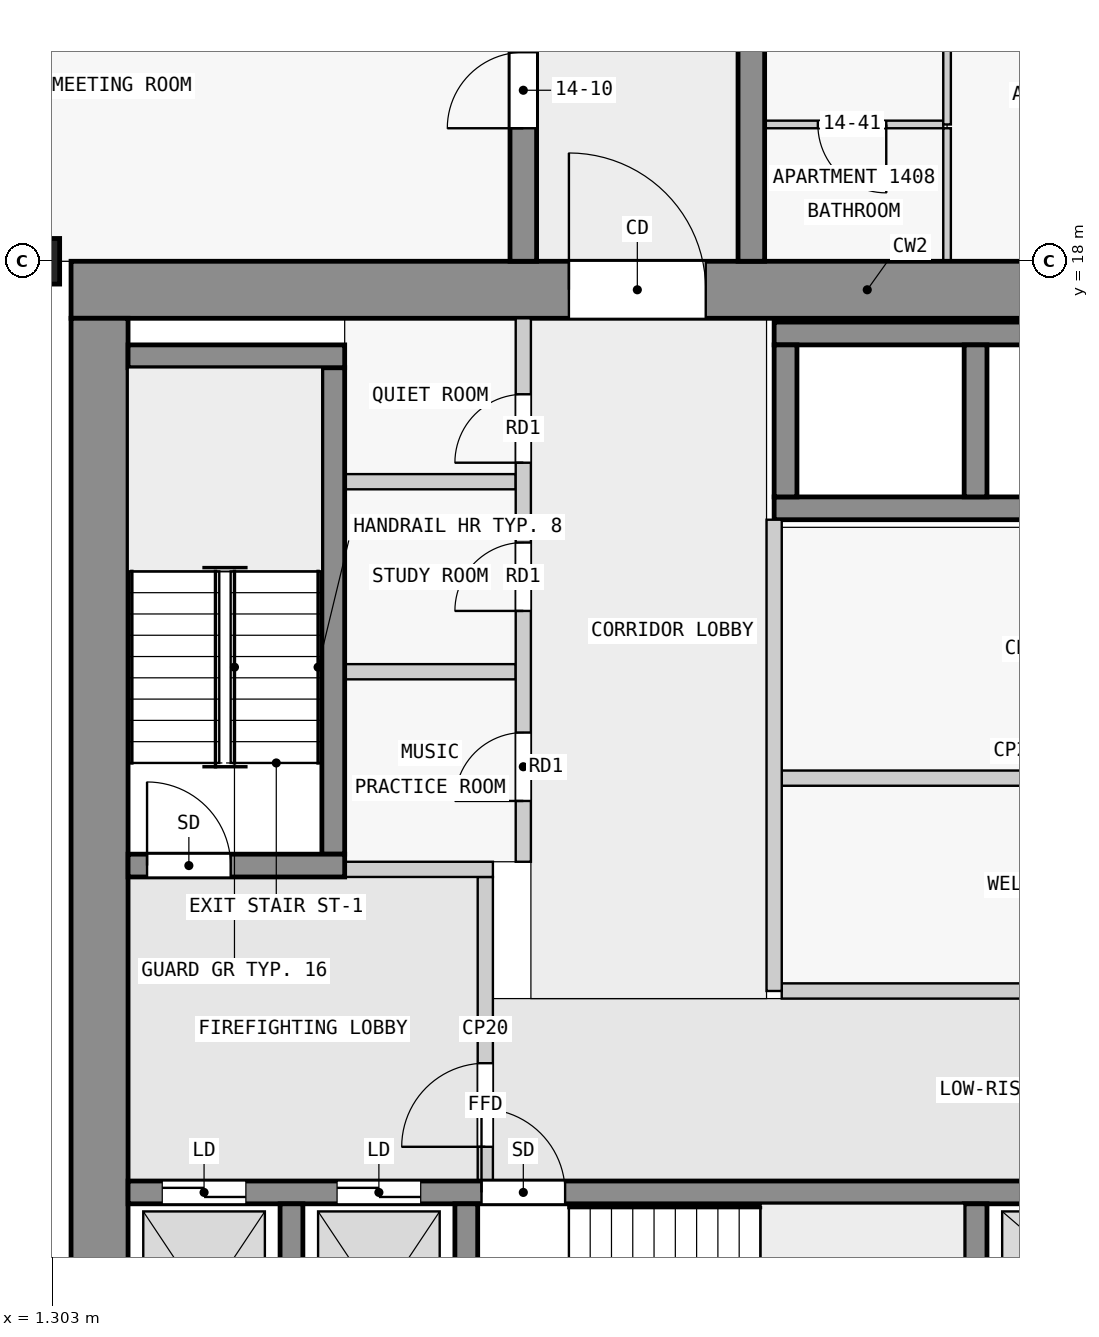
"""IFC4 building model, lengths in metres.
Left out: names, types, materials, properties, quantities, classifications, styles, units other than length and angle.
Written with IfcOpenShell. Run it as: python <this file> out.ifc"""

import sys

from ifc_helpers import new_model, si_unit, direction, frame, frame_2d, origin, origin_2d, place, context, subcontext, project, spatial, rectangle, extrude, element, fill, save


model = new_model("IFC4")
c1 = context("Model", 3, precision=1e-05, world=origin(), true_north=direction((0.0, 1.0)))
c2 = subcontext(c1, "Body", "Model", "MODEL_VIEW")
j1 = project(units=[si_unit("LENGTHUNIT", "METRE"), si_unit("PLANEANGLEUNIT", "RADIAN")], contexts=[c1])
p1 = place(None, origin())
s1 = spatial("IfcSite", under=j1, at=p1, CompositionType="ELEMENT")
p2 = place(p1, origin())
s2 = spatial("IfcBuilding", under=s1, at=p2, CompositionType="ELEMENT")
p3 = place(p2, frame((0.0, 0.0, 58.3)))
s3 = spatial("IfcBuildingStorey", under=s2, at=p3, CompositionType="ELEMENT", Elevation=58.3)
p4 = place(p3, frame((0.7, 18.0, 0.0), z_axis=(0.0, 0.0, 1.0), x_axis=(0.0, 1.0, 0.0)))
e1 = element("IfcColumn", 1, at=p4, inside=s3, PredefinedType="COLUMN", context=c2, shape_type="SweptSolid", body=[
    extrude(rectangle(XDim=0.6, YDim=1.4, at=origin_2d()), origin(), (0.0, 0.0, 1.0), 3.5),
])
p5 = place(p3, frame((1.55, 17.625, 0.0), z_axis=(0.0, 0.0, 1.0), x_axis=(1.0, 0.0, 0.0)))
e2 = element("IfcWall", 2, at=p5, inside=s3, PredefinedType="SHEAR", context=c2, shape_type="SweptSolid", body=[
    extrude(rectangle(XDim=20.95, YDim=0.75, at=frame_2d((10.475, 0.0))), origin(), (0.0, 0.0, 1.0), 3.25),
])
p6 = place(p5, frame((6.55, 0.0, 0.0)))
e3 = element("IfcOpeningElement", 3, at=p6, cuts=e2, PredefinedType="OPENING", context=c2, shape_type="SweptSolid", body=[
    extrude(rectangle(XDim=1.8, YDim=2.1, at=frame_2d((0.9, 1.05))), frame((0.0, 0.385, 0.0), z_axis=(0.0, -1.0, 0.0), x_axis=(1.0, 0.0, 0.0)), (0.0, 0.0, 1.0), 0.77),
])
p7 = place(p3, frame((1.925, 2.5, 0.0), z_axis=(0.0, 0.0, 1.0), x_axis=(0.0, 1.0, 0.0)))
e4 = element("IfcWall", 4, at=p7, inside=s3, PredefinedType="SHEAR", context=c2, shape_type="SweptSolid", body=[
    extrude(rectangle(XDim=14.75, YDim=0.75, at=frame_2d((7.375, 0.0))), origin(), (0.0, 0.0, 1.0), 3.25),
])
for number, where, z_axis, x_axis in (
    (5, (4.45, 2.8, 0.0), (0.0, 0.0, 1.0), (0.0, 1.0, 0.0)),
    (6, (6.75, 2.8, 0.0), (0.0, 0.0, 1.0), (0.0, 1.0, 0.0)),
    (7, (13.45, 2.8, 0.0), (0.0, 0.0, 1.0), (0.0, 1.0, 0.0)),
):
    element("IfcWall", number, at=place(p3, frame(where, z_axis=z_axis, x_axis=x_axis)), inside=s3, PredefinedType="SHEAR", context=c2, shape_type="SweptSolid", body=[
        extrude(rectangle(XDim=2.8, YDim=0.3, at=frame_2d((1.4, 0.0))), origin(), (0.0, 0.0, 1.0), 3.25),
    ])
p8 = place(p3, frame((2.3, 5.75, 0.0), z_axis=(0.0, 0.0, 1.0), x_axis=(1.0, 0.0, 0.0)))
e8 = element("IfcWall", 8, at=p8, inside=s3, PredefinedType="SHEAR", context=c2, shape_type="SweptSolid", body=[
    extrude(rectangle(XDim=18.8, YDim=0.3, at=frame_2d((9.4, 0.0))), origin(), (0.0, 0.0, 1.0), 3.25),
])
p9 = place(p8, frame((4.65, 0.0, 0.0)))
e9 = element("IfcOpeningElement", 9, at=p9, cuts=e8, PredefinedType="OPENING", context=c2, shape_type="SweptSolid", body=[
    extrude(rectangle(XDim=1.1, YDim=2.1, at=frame_2d((0.55, 1.05))), frame((0.0, 0.16, 0.0), z_axis=(0.0, -1.0, 0.0), x_axis=(1.0, 0.0, 0.0)), (0.0, 0.0, 1.0), 0.32),
])
p10 = place(p8, frame((0.45, 0.0, 0.0)))
e10 = element("IfcOpeningElement", 10, at=p10, cuts=e8, PredefinedType="OPENING", context=c2, shape_type="SweptSolid", body=[
    extrude(rectangle(XDim=1.1, YDim=2.1, at=frame_2d((0.55, 1.05))), frame((0.0, 0.16, 0.0), z_axis=(0.0, -1.0, 0.0), x_axis=(1.0, 0.0, 0.0)), (0.0, 0.0, 1.0), 0.32),
])
p11 = place(p8, frame((2.75, 0.0, 0.0)))
e11 = element("IfcOpeningElement", 11, at=p11, cuts=e8, PredefinedType="OPENING", context=c2, shape_type="SweptSolid", body=[
    extrude(rectangle(XDim=1.1, YDim=2.1, at=frame_2d((0.55, 1.05))), frame((0.0, 0.16, 0.0), z_axis=(0.0, -1.0, 0.0), x_axis=(1.0, 0.0, 0.0)), (0.0, 0.0, 1.0), 0.32),
])
p12 = place(p8, frame((11.85, 0.0, 0.0)))
e12 = element("IfcOpeningElement", 12, at=p12, cuts=e8, PredefinedType="OPENING", context=c2, shape_type="SweptSolid", body=[
    extrude(rectangle(XDim=1.1, YDim=2.1, at=frame_2d((0.55, 1.05))), frame((0.0, 0.16, 0.0), z_axis=(0.0, -1.0, 0.0), x_axis=(1.0, 0.0, 0.0)), (0.0, 0.0, 1.0), 0.32),
])
p13 = place(p8, frame((14.35, 0.0, 0.0)))
e13 = element("IfcOpeningElement", 13, at=p13, cuts=e8, PredefinedType="OPENING", context=c2, shape_type="SweptSolid", body=[
    extrude(rectangle(XDim=1.1, YDim=2.1, at=frame_2d((0.55, 1.05))), frame((0.0, 0.16, 0.0), z_axis=(0.0, -1.0, 0.0), x_axis=(1.0, 0.0, 0.0)), (0.0, 0.0, 1.0), 0.32),
])
p14 = place(p8, frame((16.85, 0.0, 0.0)))
e14 = element("IfcOpeningElement", 14, at=p14, cuts=e8, PredefinedType="OPENING", context=c2, shape_type="SweptSolid", body=[
    extrude(rectangle(XDim=1.1, YDim=2.1, at=frame_2d((0.55, 1.05))), frame((0.0, 0.16, 0.0), z_axis=(0.0, -1.0, 0.0), x_axis=(1.0, 0.0, 0.0)), (0.0, 0.0, 1.0), 0.32),
])
p15 = place(p3, frame((2.3, 10.05, 0.0), z_axis=(0.0, 0.0, 1.0), x_axis=(1.0, 0.0, 0.0)))
e15 = element("IfcWall", 15, at=p15, inside=s3, PredefinedType="SHEAR", context=c2, shape_type="SweptSolid", body=[
    extrude(rectangle(XDim=2.85, YDim=0.3, at=frame_2d((1.425, 0.0))), origin(), (0.0, 0.0, 1.0), 3.25),
])
p16 = place(p15, frame((0.25, 0.0, 0.0)))
e16 = element("IfcOpeningElement", 16, at=p16, cuts=e15, PredefinedType="OPENING", context=c2, shape_type="SweptSolid", body=[
    extrude(rectangle(XDim=1.1, YDim=2.1, at=frame_2d((0.55, 1.05))), frame((0.0, 0.16, 0.0), z_axis=(0.0, -1.0, 0.0), x_axis=(1.0, 0.0, 0.0)), (0.0, 0.0, 1.0), 0.32),
])
p17 = place(p3, frame((5.0, 10.2, 0.0), z_axis=(0.0, 0.0, 1.0), x_axis=(0.0, 1.0, 0.0)))
e17 = element("IfcWall", 17, at=p17, inside=s3, PredefinedType="SHEAR", context=c2, shape_type="SweptSolid", body=[
    extrude(rectangle(XDim=6.4, YDim=0.3, at=frame_2d((3.2, 0.0))), origin(), (0.0, 0.0, 1.0), 3.25),
])
p18 = place(p3, frame((2.3, 16.75, 0.0), z_axis=(0.0, 0.0, 1.0), x_axis=(1.0, 0.0, 0.0)))
e18 = element("IfcWall", 18, at=p18, inside=s3, PredefinedType="SHEAR", context=c2, shape_type="SweptSolid", body=[
    extrude(rectangle(XDim=2.85, YDim=0.3, at=frame_2d((1.425, 0.0))), origin(), (0.0, 0.0, 1.0), 3.25),
])
for number, where, z_axis, x_axis in (
    (19, (10.8, 17.05, 0.0), (0.0, 0.0, 1.0), (1.0, 0.0, 0.0)),
    (20, (10.8, 14.75, 0.0), (0.0, 0.0, 1.0), (1.0, 0.0, 0.0)),
):
    element("IfcWall", number, at=place(p3, frame(where, z_axis=z_axis, x_axis=x_axis)), inside=s3, PredefinedType="SHEAR", context=c2, shape_type="SweptSolid", body=[
        extrude(rectangle(XDim=7.8, YDim=0.3, at=frame_2d((3.9, 0.0))), origin(), (0.0, 0.0, 1.0), 3.25),
    ])
for number, where, z_axis, x_axis in (
    (21, (10.95, 14.9, 0.0), (0.0, 0.0, 1.0), (0.0, 1.0, 0.0)),
    (22, (13.45, 14.9, 0.0), (0.0, 0.0, 1.0), (0.0, 1.0, 0.0)),
):
    element("IfcWall", number, at=place(p3, frame(where, z_axis=z_axis, x_axis=x_axis)), inside=s3, PredefinedType="SHEAR", context=c2, shape_type="SweptSolid", body=[
        extrude(rectangle(XDim=2.0, YDim=0.3, at=frame_2d((1.0, 0.0))), origin(), (0.0, 0.0, 1.0), 3.25),
    ])
p19 = place(p3, frame((7.5, 18.0, 0.0), z_axis=(0.0, 0.0, 1.0), x_axis=(0.0, 1.0, 0.0)))
e23 = element("IfcWall", 23, at=p19, inside=s3, PredefinedType="SHEAR", context=c2, shape_type="SweptSolid", body=[
    extrude(rectangle(XDim=27.0, YDim=0.35, at=frame_2d((13.5, 0.0))), origin(), (0.0, 0.0, 1.0), 3.25),
])
p20 = place(p19, frame((1.75, 0.0, 0.0)))
e24 = element("IfcOpeningElement", 24, at=p20, cuts=e23, PredefinedType="OPENING", context=c2, shape_type="SweptSolid", body=[
    extrude(rectangle(XDim=1.0, YDim=2.1, at=frame_2d((0.5, 1.05))), frame((0.0, 0.185, 0.0), z_axis=(0.0, -1.0, 0.0), x_axis=(1.0, 0.0, 0.0)), (0.0, 0.0, 1.0), 0.37),
])
p21 = place(p19, frame((8.55, 0.0, 0.0)))
e25 = element("IfcOpeningElement", 25, at=p21, cuts=e23, PredefinedType="OPENING", context=c2, shape_type="SweptSolid", body=[
    extrude(rectangle(XDim=1.0, YDim=2.1, at=frame_2d((0.5, 1.05))), frame((0.0, 0.185, 0.0), z_axis=(0.0, -1.0, 0.0), x_axis=(1.0, 0.0, 0.0)), (0.0, 0.0, 1.0), 0.37),
])
p22 = place(p19, frame((15.25, 0.0, 0.0)))
e26 = element("IfcOpeningElement", 26, at=p22, cuts=e23, PredefinedType="OPENING", context=c2, shape_type="SweptSolid", body=[
    extrude(rectangle(XDim=1.0, YDim=2.1, at=frame_2d((0.5, 1.05))), frame((0.0, 0.185, 0.0), z_axis=(0.0, -1.0, 0.0), x_axis=(1.0, 0.0, 0.0)), (0.0, 0.0, 1.0), 0.37),
])
p23 = place(p19, frame((21.35, 0.0, 0.0)))
e27 = element("IfcOpeningElement", 27, at=p23, cuts=e23, PredefinedType="OPENING", context=c2, shape_type="SweptSolid", body=[
    extrude(rectangle(XDim=1.0, YDim=2.1, at=frame_2d((0.5, 1.05))), frame((0.0, 0.185, 0.0), z_axis=(0.0, -1.0, 0.0), x_axis=(1.0, 0.0, 0.0)), (0.0, 0.0, 1.0), 0.37),
])
p24 = place(p3, frame((10.5, 18.0, 0.0), z_axis=(0.0, 0.0, 1.0), x_axis=(0.0, 1.0, 0.0)))
e28 = element("IfcWall", 28, at=p24, inside=s3, PredefinedType="SHEAR", context=c2, shape_type="SweptSolid", body=[
    extrude(rectangle(XDim=27.0, YDim=0.35, at=frame_2d((13.5, 0.0))), origin(), (0.0, 0.0, 1.0), 3.25),
])
p25 = place(p24, frame((4.05, 0.0, 0.0)))
e29 = element("IfcOpeningElement", 29, at=p25, cuts=e28, PredefinedType="OPENING", context=c2, shape_type="SweptSolid", body=[
    extrude(rectangle(XDim=1.0, YDim=2.1, at=frame_2d((0.5, 1.05))), frame((0.0, 0.185, 0.0), z_axis=(0.0, -1.0, 0.0), x_axis=(1.0, 0.0, 0.0)), (0.0, 0.0, 1.0), 0.37),
])
p26 = place(p24, frame((10.75, 0.0, 0.0)))
e30 = element("IfcOpeningElement", 30, at=p26, cuts=e28, PredefinedType="OPENING", context=c2, shape_type="SweptSolid", body=[
    extrude(rectangle(XDim=1.0, YDim=2.1, at=frame_2d((0.5, 1.05))), frame((0.0, 0.185, 0.0), z_axis=(0.0, -1.0, 0.0), x_axis=(1.0, 0.0, 0.0)), (0.0, 0.0, 1.0), 0.37),
])
p27 = place(p24, frame((15.25, 0.0, 0.0)))
e31 = element("IfcOpeningElement", 31, at=p27, cuts=e28, PredefinedType="OPENING", context=c2, shape_type="SweptSolid", body=[
    extrude(rectangle(XDim=1.0, YDim=2.1, at=frame_2d((0.5, 1.05))), frame((0.0, 0.185, 0.0), z_axis=(0.0, -1.0, 0.0), x_axis=(1.0, 0.0, 0.0)), (0.0, 0.0, 1.0), 0.37),
])
p28 = place(p24, frame((19.75, 0.0, 0.0)))
e32 = element("IfcOpeningElement", 32, at=p28, cuts=e28, PredefinedType="OPENING", context=c2, shape_type="SweptSolid", body=[
    extrude(rectangle(XDim=1.0, YDim=2.1, at=frame_2d((0.5, 1.05))), frame((0.0, 0.185, 0.0), z_axis=(0.0, -1.0, 0.0), x_axis=(1.0, 0.0, 0.0)), (0.0, 0.0, 1.0), 0.37),
])
p29 = place(p24, frame((23.25, 0.0, 0.0)))
e33 = element("IfcOpeningElement", 33, at=p29, cuts=e28, PredefinedType="OPENING", context=c2, shape_type="SweptSolid", body=[
    extrude(rectangle(XDim=0.9, YDim=2.1, at=frame_2d((0.45, 1.05))), frame((0.0, 0.185, 0.0), z_axis=(0.0, -1.0, 0.0), x_axis=(1.0, 0.0, 0.0)), (0.0, 0.0, 1.0), 0.37),
])
p30 = place(p24, frame((25.45, 0.0, 0.0)))
e34 = element("IfcOpeningElement", 34, at=p30, cuts=e28, PredefinedType="OPENING", context=c2, shape_type="SweptSolid", body=[
    extrude(rectangle(XDim=1.0, YDim=2.1, at=frame_2d((0.5, 1.05))), frame((0.0, 0.185, 0.0), z_axis=(0.0, -1.0, 0.0), x_axis=(1.0, 0.0, 0.0)), (0.0, 0.0, 1.0), 0.37),
])
p31 = place(p3, frame((7.0, 5.9, 0.0), z_axis=(0.0, 0.0, 1.0), x_axis=(0.0, 1.0, 0.0)))
e35 = element("IfcWall", 35, at=p31, inside=s3, PredefinedType="PARTITIONING", context=c2, shape_type="SweptSolid", body=[
    extrude(rectangle(XDim=4.0, YDim=0.2, at=frame_2d((2.0, 0.0))), origin(), (0.0, 0.0, 1.0), 3.25),
])
p32 = place(p31, frame((0.45, 0.0, 0.0)))
e36 = element("IfcOpeningElement", 36, at=p32, cuts=e35, PredefinedType="OPENING", context=c2, shape_type="SweptSolid", body=[
    extrude(rectangle(XDim=1.1, YDim=2.1, at=frame_2d((0.55, 1.05))), frame((0.0, 0.11, 0.0), z_axis=(0.0, -1.0, 0.0), x_axis=(1.0, 0.0, 0.0)), (0.0, 0.0, 1.0), 0.22),
])
p33 = place(p3, frame((5.15, 10.0, 0.0), z_axis=(0.0, 0.0, 1.0), x_axis=(1.0, 0.0, 0.0)))
e37 = element("IfcWall", 37, at=p33, inside=s3, PredefinedType="PARTITIONING", context=c2, shape_type="SweptSolid", body=[
    extrude(rectangle(XDim=1.95, YDim=0.2, at=frame_2d((0.975, 0.0))), origin(), (0.0, 0.0, 1.0), 3.25),
])
p34 = place(p3, frame((10.8, 8.4, 0.0), z_axis=(0.0, 0.0, 1.0), x_axis=(0.0, 1.0, 0.0)))
e38 = element("IfcWall", 38, at=p34, inside=s3, PredefinedType="PARTITIONING", context=c2, shape_type="SweptSolid", body=[
    extrude(rectangle(XDim=6.2, YDim=0.2, at=frame_2d((3.1, 0.0))), origin(), (0.0, 0.0, 1.0), 3.25),
])
for number, where, z_axis, x_axis in (
    (39, (10.9, 8.4, 0.0), (0.0, 0.0, 1.0), (1.0, 0.0, 0.0)),
    (40, (10.9, 11.2, 0.0), (0.0, 0.0, 1.0), (1.0, 0.0, 0.0)),
):
    element("IfcWall", number, at=place(p3, frame(where, z_axis=z_axis, x_axis=x_axis)), inside=s3, PredefinedType="PARTITIONING", context=c2, shape_type="SweptSolid", body=[
        extrude(rectangle(XDim=7.4, YDim=0.2, at=frame_2d((3.7, 0.0))), origin(), (0.0, 0.0, 1.0), 3.25),
    ])
p35 = place(p3, frame((7.5, 10.1, 0.0), z_axis=(0.0, 0.0, 1.0), x_axis=(0.0, 1.0, 0.0)))
e41 = element("IfcWall", 41, at=p35, inside=s3, PredefinedType="PARTITIONING", context=c2, shape_type="SweptSolid", body=[
    extrude(rectangle(XDim=7.15, YDim=0.2, at=frame_2d((3.575, 0.0))), origin(), (0.0, 0.0, 1.0), 3.25),
])
p36 = place(p35, frame((0.8, 0.0, 0.0)))
e42 = element("IfcOpeningElement", 42, at=p36, cuts=e41, PredefinedType="OPENING", context=c2, shape_type="SweptSolid", body=[
    extrude(rectangle(XDim=0.9, YDim=2.1, at=frame_2d((0.45, 1.05))), frame((0.0, 0.11, 0.0), z_axis=(0.0, -1.0, 0.0), x_axis=(1.0, 0.0, 0.0)), (0.0, 0.0, 1.0), 0.22),
])
p37 = place(p35, frame((3.3, 0.0, 0.0)))
e43 = element("IfcOpeningElement", 43, at=p37, cuts=e41, PredefinedType="OPENING", context=c2, shape_type="SweptSolid", body=[
    extrude(rectangle(XDim=0.9, YDim=2.1, at=frame_2d((0.45, 1.05))), frame((0.0, 0.11, 0.0), z_axis=(0.0, -1.0, 0.0), x_axis=(1.0, 0.0, 0.0)), (0.0, 0.0, 1.0), 0.22),
])
p38 = place(p35, frame((5.25, 0.0, 0.0)))
e44 = element("IfcOpeningElement", 44, at=p38, cuts=e41, PredefinedType="OPENING", context=c2, shape_type="SweptSolid", body=[
    extrude(rectangle(XDim=0.9, YDim=2.1, at=frame_2d((0.45, 1.05))), frame((0.0, 0.11, 0.0), z_axis=(0.0, -1.0, 0.0), x_axis=(1.0, 0.0, 0.0)), (0.0, 0.0, 1.0), 0.22),
])
for number, where, z_axis, x_axis in (
    (45, (5.15, 12.6, 0.0), (0.0, 0.0, 1.0), (1.0, 0.0, 0.0)),
    (46, (5.15, 15.1, 0.0), (0.0, 0.0, 1.0), (1.0, 0.0, 0.0)),
):
    element("IfcWall", number, at=place(p3, frame(where, z_axis=z_axis, x_axis=x_axis)), inside=s3, PredefinedType="PARTITIONING", context=c2, shape_type="SweptSolid", body=[
        extrude(rectangle(XDim=2.25, YDim=0.2, at=frame_2d((1.125, 0.0))), origin(), (0.0, 0.0, 1.0), 3.25),
    ])
p39 = place(p3, frame((13.025, 19.8, 0.0), z_axis=(0.0, 0.0, 1.0), x_axis=(-1.0, 0.0, 0.0)))
e47 = element("IfcWall", 47, at=p39, inside=s3, PredefinedType="PARTITIONING", context=c2, shape_type="SweptSolid", body=[
    extrude(rectangle(XDim=2.35, YDim=0.1, at=frame_2d((1.175, 0.0))), origin(), (0.0, 0.0, 1.0), 3.25),
])
p40 = place(p39, frame((0.75, 0.0, 0.0)))
e48 = element("IfcOpeningElement", 48, at=p40, cuts=e47, PredefinedType="OPENING", context=c2, shape_type="SweptSolid", body=[
    extrude(rectangle(XDim=0.9, YDim=2.1, at=frame_2d((0.45, 1.05))), frame((0.0, 0.06, 0.0), z_axis=(0.0, -1.0, 0.0), x_axis=(1.0, 0.0, 0.0)), (0.0, 0.0, 1.0), 0.12),
])
p41 = place(p3, frame((13.075, 22.45, 0.0), z_axis=(0.0, 0.0, 1.0), x_axis=(0.0, -1.0, 0.0)))
e49 = element("IfcWall", 49, at=p41, inside=s3, PredefinedType="PARTITIONING", context=c2, shape_type="SweptSolid", body=[
    extrude(rectangle(XDim=2.65, YDim=0.1, at=frame_2d((1.325, 0.0))), origin(), (0.0, 0.0, 1.0), 3.25),
])
p42 = place(p3, frame((13.075, 18.0, 0.0), z_axis=(0.0, 0.0, 1.0), x_axis=(0.0, 1.0, 0.0)))
e50 = element("IfcWall", 50, at=p42, inside=s3, PredefinedType="PARTITIONING", context=c2, shape_type="SweptSolid", body=[
    extrude(rectangle(XDim=1.75, YDim=0.1, at=frame_2d((0.875, 0.0))), origin(), (0.0, 0.0, 1.0), 3.25),
])
p43 = place(p32, origin())
e51 = element("IfcDoor", 51, at=p43, inside=s3, OperationType="SINGLE_SWING_LEFT", PredefinedType="DOOR", context=c2, shape_type="SweptSolid", body=[
    extrude(rectangle(XDim=1.1, YDim=2.1, at=frame_2d((0.55, 1.05))), frame((0.0, 0.025, 0.0), z_axis=(0.0, -1.0, 0.0), x_axis=(1.0, 0.0, 0.0)), (0.0, 0.0, 1.0), 0.05),
])
fill(e36, e51)
p44 = place(p16, origin())
e52 = element("IfcDoor", 52, at=p44, inside=s3, OperationType="SINGLE_SWING_RIGHT", PredefinedType="DOOR", context=c2, shape_type="SweptSolid", body=[
    extrude(rectangle(XDim=1.1, YDim=2.1, at=frame_2d((0.55, 1.05))), frame((0.0, 0.025, 0.0), z_axis=(0.0, -1.0, 0.0), x_axis=(1.0, 0.0, 0.0)), (0.0, 0.0, 1.0), 0.05),
])
fill(e16, e52)
p45 = place(p9, origin())
e53 = element("IfcDoor", 53, at=p45, inside=s3, OperationType="SINGLE_SWING_LEFT", PredefinedType="DOOR", context=c2, shape_type="SweptSolid", body=[
    extrude(rectangle(XDim=1.1, YDim=2.1, at=frame_2d((0.55, 1.05))), frame((0.0, 0.025, 0.0), z_axis=(0.0, -1.0, 0.0), x_axis=(1.0, 0.0, 0.0)), (0.0, 0.0, 1.0), 0.05),
])
fill(e9, e53)
p46 = place(p10, origin())
e54 = element("IfcDoor", 54, at=p46, inside=s3, OperationType="DOUBLE_DOOR_SLIDING", PredefinedType="DOOR", context=c2, shape_type="SweptSolid", body=[
    extrude(rectangle(XDim=1.1, YDim=2.1, at=frame_2d((0.55, 1.05))), frame((0.0, 0.025, 0.0), z_axis=(0.0, -1.0, 0.0), x_axis=(1.0, 0.0, 0.0)), (0.0, 0.0, 1.0), 0.05),
])
fill(e10, e54)
p47 = place(p11, origin())
e55 = element("IfcDoor", 55, at=p47, inside=s3, OperationType="DOUBLE_DOOR_SLIDING", PredefinedType="DOOR", context=c2, shape_type="SweptSolid", body=[
    extrude(rectangle(XDim=1.1, YDim=2.1, at=frame_2d((0.55, 1.05))), frame((0.0, 0.025, 0.0), z_axis=(0.0, -1.0, 0.0), x_axis=(1.0, 0.0, 0.0)), (0.0, 0.0, 1.0), 0.05),
])
fill(e11, e55)
p48 = place(p6, origin())
e56 = element("IfcDoor", 56, at=p48, inside=s3, OperationType="DOUBLE_DOOR_SINGLE_SWING", PredefinedType="DOOR", context=c2, shape_type="SweptSolid", body=[
    extrude(rectangle(XDim=1.8, YDim=2.1, at=frame_2d((0.9, 1.05))), frame((0.0, 0.025, 0.0), z_axis=(0.0, -1.0, 0.0), x_axis=(1.0, 0.0, 0.0)), (0.0, 0.0, 1.0), 0.05),
])
fill(e3, e56)
p49 = place(p36, origin())
e57 = element("IfcDoor", 57, at=p49, inside=s3, OperationType="SINGLE_SWING_RIGHT", PredefinedType="DOOR", context=c2, shape_type="SweptSolid", body=[
    extrude(rectangle(XDim=0.9, YDim=2.1, at=frame_2d((0.45, 1.05))), frame((0.0, 0.025, 0.0), z_axis=(0.0, -1.0, 0.0), x_axis=(1.0, 0.0, 0.0)), (0.0, 0.0, 1.0), 0.05),
])
fill(e42, e57)
p50 = place(p37, origin())
e58 = element("IfcDoor", 58, at=p50, inside=s3, OperationType="SINGLE_SWING_RIGHT", PredefinedType="DOOR", context=c2, shape_type="SweptSolid", body=[
    extrude(rectangle(XDim=0.9, YDim=2.1, at=frame_2d((0.45, 1.05))), frame((0.0, 0.025, 0.0), z_axis=(0.0, -1.0, 0.0), x_axis=(1.0, 0.0, 0.0)), (0.0, 0.0, 1.0), 0.05),
])
fill(e43, e58)
p51 = place(p38, origin())
e59 = element("IfcDoor", 59, at=p51, inside=s3, OperationType="SINGLE_SWING_RIGHT", PredefinedType="DOOR", context=c2, shape_type="SweptSolid", body=[
    extrude(rectangle(XDim=0.9, YDim=2.1, at=frame_2d((0.45, 1.05))), frame((0.0, 0.025, 0.0), z_axis=(0.0, -1.0, 0.0), x_axis=(1.0, 0.0, 0.0)), (0.0, 0.0, 1.0), 0.05),
])
fill(e44, e59)
p52 = place(p20, origin())
e60 = element("IfcDoor", 60, at=p52, inside=s3, OperationType="SINGLE_SWING_LEFT", PredefinedType="DOOR", context=c2, shape_type="SweptSolid", body=[
    extrude(rectangle(XDim=1.0, YDim=2.1, at=frame_2d((0.5, 1.05))), frame((0.0, 0.025, 0.0), z_axis=(0.0, -1.0, 0.0), x_axis=(1.0, 0.0, 0.0)), (0.0, 0.0, 1.0), 0.05),
])
fill(e24, e60)
p53 = place(p40, origin())
e61 = element("IfcDoor", 61, at=p53, inside=s3, OperationType="SINGLE_SWING_RIGHT", PredefinedType="DOOR", context=c2, shape_type="SweptSolid", body=[
    extrude(rectangle(XDim=0.9, YDim=2.1, at=frame_2d((0.45, 1.05))), frame((0.0, 0.025, 0.0), z_axis=(0.0, -1.0, 0.0), x_axis=(1.0, 0.0, 0.0)), (0.0, 0.0, 1.0), 0.05),
])
fill(e48, e61)
save(model, sys.argv[1])
